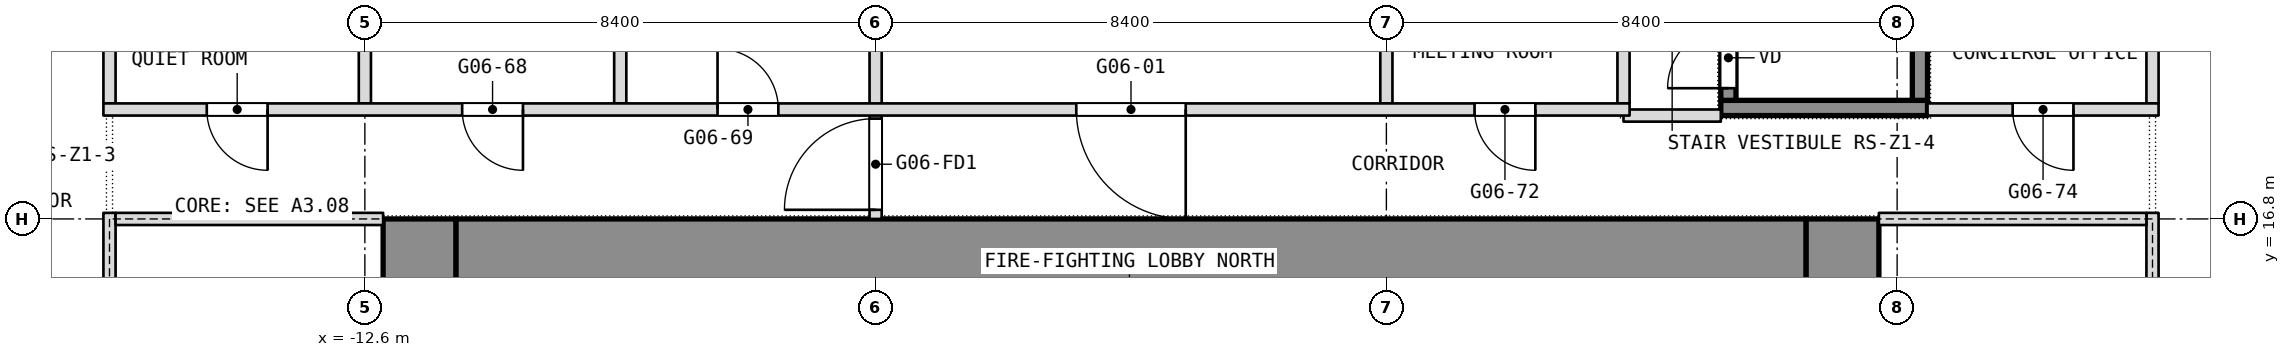
"""IFC4 building model, lengths in metres.
Left out: names, types, materials, properties, quantities, classifications, styles, units other than length and angle.
Written with IfcOpenShell. Run it as: python <this file> out.ifc"""

import sys

from ifc_helpers import new_model, si_unit, direction, frame, frame_2d, origin, place, context, subcontext, project, spatial, rectangle, extrude, element, fill, save


model = new_model("IFC4")
c1 = context("Model", 3, precision=1e-05, world=origin(), true_north=direction((0.0, 1.0)))
c2 = subcontext(c1, "Body", "Model", "MODEL_VIEW")
j1 = project(units=[si_unit("LENGTHUNIT", "METRE"), si_unit("PLANEANGLEUNIT", "RADIAN")], contexts=[c1])
p1 = place(None, origin())
s1 = spatial("IfcSite", under=j1, at=p1, CompositionType="ELEMENT")
p2 = place(p1, origin())
s2 = spatial("IfcBuilding", under=s1, at=p2, CompositionType="ELEMENT")
p3 = place(p2, frame((0.0, 0.0, 72.5)))
s3 = spatial("IfcBuildingStorey", under=s2, at=p3, CompositionType="ELEMENT", Elevation=72.5)
p4 = place(p3, frame((11.7, 0.0, 0.0), z_axis=(0.0, 0.0, 1.0), x_axis=(0.0, 1.0, 0.0)))
e1 = element("IfcWall", 1, at=p4, inside=s3, PredefinedType="SHEAR", context=c2, shape_type="SweptSolid", body=[
    extrude(rectangle(XDim=16.8, YDim=1.2, at=frame_2d((8.4, 0.0))), origin(), (0.0, 0.0, 1.0), 3.6),
])
p5 = place(p4, frame((1.688, 0.0, 0.0)))
e2 = element("IfcOpeningElement", 2, at=p5, cuts=e1, PredefinedType="OPENING", context=c2, shape_type="SweptSolid", body=[
    extrude(rectangle(XDim=0.9, YDim=2.1, at=frame_2d((0.45, 1.05))), frame((0.0, 0.6, 0.0), z_axis=(0.0, -1.0, 0.0), x_axis=(1.0, 0.0, 0.0)), (0.0, 0.0, 1.0), 1.2),
])
p6 = place(p4, frame((4.312, 0.0, 0.0)))
e3 = element("IfcOpeningElement", 3, at=p6, cuts=e1, PredefinedType="OPENING", context=c2, shape_type="SweptSolid", body=[
    extrude(rectangle(XDim=0.9, YDim=2.1, at=frame_2d((0.45, 1.05))), frame((0.0, 0.6, 0.0), z_axis=(0.0, -1.0, 0.0), x_axis=(1.0, 0.0, 0.0)), (0.0, 0.0, 1.0), 1.2),
])
p7 = place(p4, frame((6.825, 0.0, 0.0)))
e4 = element("IfcOpeningElement", 4, at=p7, cuts=e1, PredefinedType="OPENING", context=c2, shape_type="SweptSolid", body=[
    extrude(rectangle(XDim=1.2, YDim=2.1, at=frame_2d((0.6, 1.05))), frame((0.0, 0.6, 0.0), z_axis=(0.0, -1.0, 0.0), x_axis=(1.0, 0.0, 0.0)), (0.0, 0.0, 1.0), 1.2),
])
p8 = place(p4, frame((14.212, 0.0, 0.0)))
e5 = element("IfcOpeningElement", 5, at=p8, cuts=e1, PredefinedType="OPENING", context=c2, shape_type="SweptSolid", body=[
    extrude(rectangle(XDim=0.9, YDim=2.1, at=frame_2d((0.45, 1.05))), frame((0.0, 0.6, 0.0), z_axis=(0.0, -1.0, 0.0), x_axis=(1.0, 0.0, 0.0)), (0.0, 0.0, 1.0), 1.2),
])
p9 = place(p4, frame((11.587, 0.0, 0.0)))
e6 = element("IfcOpeningElement", 6, at=p9, cuts=e1, PredefinedType="OPENING", context=c2, shape_type="SweptSolid", body=[
    extrude(rectangle(XDim=0.9, YDim=2.1, at=frame_2d((0.45, 1.05))), frame((0.0, 0.6, 0.0), z_axis=(0.0, -1.0, 0.0), x_axis=(1.0, 0.0, 0.0)), (0.0, 0.0, 1.0), 1.2),
])
p10 = place(p4, frame((8.775, 0.0, 0.0)))
e7 = element("IfcOpeningElement", 7, at=p10, cuts=e1, PredefinedType="OPENING", context=c2, shape_type="SweptSolid", body=[
    extrude(rectangle(XDim=1.2, YDim=2.1, at=frame_2d((0.6, 1.05))), frame((0.0, 0.6, 0.0), z_axis=(0.0, -1.0, 0.0), x_axis=(1.0, 0.0, 0.0)), (0.0, 0.0, 1.0), 1.2),
])
p11 = place(p3, frame((-11.7, 0.0, 0.0), z_axis=(0.0, 0.0, 1.0), x_axis=(0.0, 1.0, 0.0)))
e8 = element("IfcWall", 8, at=p11, inside=s3, PredefinedType="SHEAR", context=c2, shape_type="SweptSolid", body=[
    extrude(rectangle(XDim=16.8, YDim=1.2, at=frame_2d((8.4, 0.0))), origin(), (0.0, 0.0, 1.0), 3.6),
])
p12 = place(p11, frame((2.3, 0.0, 0.0)))
e9 = element("IfcOpeningElement", 9, at=p12, cuts=e8, PredefinedType="OPENING", context=c2, shape_type="SweptSolid", body=[
    extrude(rectangle(XDim=1.1, YDim=2.1, at=frame_2d((0.55, 1.05))), frame((0.0, 0.6, 0.0), z_axis=(0.0, -1.0, 0.0), x_axis=(1.0, 0.0, 0.0)), (0.0, 0.0, 1.0), 1.2),
])
p13 = place(p11, frame((4.85, 0.0, 0.0)))
e10 = element("IfcOpeningElement", 10, at=p13, cuts=e8, PredefinedType="OPENING", context=c2, shape_type="SweptSolid", body=[
    extrude(rectangle(XDim=1.1, YDim=2.1, at=frame_2d((0.55, 1.05))), frame((0.0, 0.6, 0.0), z_axis=(0.0, -1.0, 0.0), x_axis=(1.0, 0.0, 0.0)), (0.0, 0.0, 1.0), 1.2),
])
p14 = place(p11, frame((6.825, 0.0, 0.0)))
e11 = element("IfcOpeningElement", 11, at=p14, cuts=e8, PredefinedType="OPENING", context=c2, shape_type="SweptSolid", body=[
    extrude(rectangle(XDim=1.2, YDim=2.1, at=frame_2d((0.6, 1.05))), frame((0.0, 0.6, 0.0), z_axis=(0.0, -1.0, 0.0), x_axis=(1.0, 0.0, 0.0)), (0.0, 0.0, 1.0), 1.2),
])
p15 = place(p11, frame((13.4, 0.0, 0.0)))
e12 = element("IfcOpeningElement", 12, at=p15, cuts=e8, PredefinedType="OPENING", context=c2, shape_type="SweptSolid", body=[
    extrude(rectangle(XDim=1.1, YDim=2.1, at=frame_2d((0.55, 1.05))), frame((0.0, 0.6, 0.0), z_axis=(0.0, -1.0, 0.0), x_axis=(1.0, 0.0, 0.0)), (0.0, 0.0, 1.0), 1.2),
])
p16 = place(p11, frame((10.85, 0.0, 0.0)))
e13 = element("IfcOpeningElement", 13, at=p16, cuts=e8, PredefinedType="OPENING", context=c2, shape_type="SweptSolid", body=[
    extrude(rectangle(XDim=1.1, YDim=2.1, at=frame_2d((0.55, 1.05))), frame((0.0, 0.6, 0.0), z_axis=(0.0, -1.0, 0.0), x_axis=(1.0, 0.0, 0.0)), (0.0, 0.0, 1.0), 1.2),
])
p17 = place(p11, frame((8.775, 0.0, 0.0)))
e14 = element("IfcOpeningElement", 14, at=p17, cuts=e8, PredefinedType="OPENING", context=c2, shape_type="SweptSolid", body=[
    extrude(rectangle(XDim=1.2, YDim=2.1, at=frame_2d((0.6, 1.05))), frame((0.0, 0.6, 0.0), z_axis=(0.0, -1.0, 0.0), x_axis=(1.0, 0.0, 0.0)), (0.0, 0.0, 1.0), 1.2),
])
p18 = place(p3, frame((-11.1, 16.2, 0.0), z_axis=(0.0, 0.0, 1.0), x_axis=(1.0, 0.0, 0.0)))
e15 = element("IfcWall", 15, at=p18, inside=s3, PredefinedType="SHEAR", context=c2, shape_type="SweptSolid", body=[
    extrude(rectangle(XDim=22.2, YDim=1.2, at=frame_2d((11.1, 0.0))), origin(), (0.0, 0.0, 1.0), 3.6),
])
p19 = place(p3, frame((16.8, 18.7, 0.0), z_axis=(0.0, 0.0, 1.0), x_axis=(0.0, 1.0, 0.0)))
e16 = element("IfcWall", 16, at=p19, inside=s3, PredefinedType="PARTITIONING", context=c2, shape_type="SweptSolid", body=[
    extrude(rectangle(XDim=3.0, YDim=0.2, at=frame_2d((1.5, 0.0))), origin(), (0.0, 0.0, 1.0), 3.34),
])
for number, where, z_axis, x_axis in (
    (17, (8.1, 18.7, 0.0), (0.0, 0.0, 1.0), (0.0, 1.0, 0.0)),
    (18, (4.2, 18.7, 0.0), (0.0, 0.0, 1.0), (0.0, 1.0, 0.0)),
):
    element("IfcWall", number, at=place(p3, frame(where, z_axis=z_axis, x_axis=x_axis)), inside=s3, PredefinedType="PARTITIONING", context=c2, shape_type="SweptSolid", body=[
        extrude(rectangle(XDim=2.8, YDim=0.2, at=frame_2d((1.4, 0.0))), origin(), (0.0, 0.0, 1.0), 3.34),
    ])
p20 = place(p3, frame((-4.2, 16.8, 0.0), z_axis=(0.0, 0.0, 1.0), x_axis=(0.0, 1.0, 0.0)))
e19 = element("IfcWall", 19, at=p20, inside=s3, PredefinedType="PARTITIONING", context=c2, shape_type="SweptSolid", body=[
    extrude(rectangle(XDim=6.7, YDim=0.2, at=frame_2d((3.35, 0.0))), origin(), (0.0, 0.0, 1.0), 3.34),
])
p21 = place(p20, frame((0.15, 0.0, 0.0)))
e20 = element("IfcOpeningElement", 20, at=p21, cuts=e19, PredefinedType="OPENING", context=c2, shape_type="SweptSolid", body=[
    extrude(rectangle(XDim=1.5, YDim=2.1, at=frame_2d((0.75, 1.05))), frame((0.0, 0.1, 0.0), z_axis=(0.0, -1.0, 0.0), x_axis=(1.0, 0.0, 0.0)), (0.0, 0.0, 1.0), 0.2),
])
p22 = place(p20, frame((4.95, 0.0, 0.0)))
e21 = element("IfcOpeningElement", 21, at=p22, cuts=e19, PredefinedType="OPENING", context=c2, shape_type="SweptSolid", body=[
    extrude(rectangle(XDim=1.5, YDim=2.1, at=frame_2d((0.75, 1.05))), frame((0.0, 0.1, 0.0), z_axis=(0.0, -1.0, 0.0), x_axis=(1.0, 0.0, 0.0)), (0.0, 0.0, 1.0), 0.2),
])
for number, where, z_axis, x_axis in (
    (22, (-8.4, 18.7, 0.0), (0.0, 0.0, 1.0), (0.0, 1.0, 0.0)),
    (23, (-12.6, 18.7, 0.0), (0.0, 0.0, 1.0), (0.0, 1.0, 0.0)),
):
    element("IfcWall", number, at=place(p3, frame(where, z_axis=z_axis, x_axis=x_axis)), inside=s3, PredefinedType="PARTITIONING", context=c2, shape_type="SweptSolid", body=[
        extrude(rectangle(XDim=2.8, YDim=0.2, at=frame_2d((1.4, 0.0))), origin(), (0.0, 0.0, 1.0), 3.34),
    ])
p23 = place(p3, frame((-16.8, 18.7, 0.0), z_axis=(0.0, 0.0, 1.0), x_axis=(0.0, 1.0, 0.0)))
e24 = element("IfcWall", 24, at=p23, inside=s3, PredefinedType="PARTITIONING", context=c2, shape_type="SweptSolid", body=[
    extrude(rectangle(XDim=3.0, YDim=0.2, at=frame_2d((1.5, 0.0))), origin(), (0.0, 0.0, 1.0), 3.34),
])
p24 = place(p3, frame((8.1, 18.5, 0.0), z_axis=(0.0, 0.0, 1.0), x_axis=(1.0, 0.0, 0.0)))
e25 = element("IfcWall", 25, at=p24, inside=s3, PredefinedType="PARTITIONING", context=c2, shape_type="SweptSolid", body=[
    extrude(rectangle(XDim=1.6, YDim=0.2, at=frame_2d((0.8, 0.0))), origin(), (0.0, 0.0, 1.0), 3.34),
])
p25 = place(p3, frame((-16.9, 18.6, 0.0), z_axis=(0.0, 0.0, 1.0), x_axis=(1.0, 0.0, 0.0)))
e26 = element("IfcWall", 26, at=p25, inside=s3, PredefinedType="PARTITIONING", context=c2, shape_type="SweptSolid", body=[
    extrude(rectangle(XDim=25.1, YDim=0.2, at=frame_2d((12.55, 0.0))), origin(), (0.0, 0.0, 1.0), 3.34),
])
p26 = place(p25, frame((16.0, 0.0, 0.0)))
e27 = element("IfcOpeningElement", 27, at=p26, cuts=e26, PredefinedType="OPENING", context=c2, shape_type="SweptSolid", body=[
    extrude(rectangle(XDim=1.8, YDim=2.1, at=frame_2d((0.9, 1.05))), frame((0.0, 0.1, 0.0), z_axis=(0.0, -1.0, 0.0), x_axis=(1.0, 0.0, 0.0)), (0.0, 0.0, 1.0), 0.2),
])
p27 = place(p25, frame((5.9, 0.0, 0.0)))
e28 = element("IfcOpeningElement", 28, at=p27, cuts=e26, PredefinedType="OPENING", context=c2, shape_type="SweptSolid", body=[
    extrude(rectangle(XDim=1.0, YDim=2.1, at=frame_2d((0.5, 1.05))), frame((0.0, 0.1, 0.0), z_axis=(0.0, -1.0, 0.0), x_axis=(1.0, 0.0, 0.0)), (0.0, 0.0, 1.0), 0.2),
])
p28 = place(p25, frame((10.1, 0.0, 0.0)))
e29 = element("IfcOpeningElement", 29, at=p28, cuts=e26, PredefinedType="OPENING", context=c2, shape_type="SweptSolid", body=[
    extrude(rectangle(XDim=1.0, YDim=2.1, at=frame_2d((0.5, 1.05))), frame((0.0, 0.1, 0.0), z_axis=(0.0, -1.0, 0.0), x_axis=(1.0, 0.0, 0.0)), (0.0, 0.0, 1.0), 0.2),
])
p29 = place(p25, frame((1.7, 0.0, 0.0)))
e30 = element("IfcOpeningElement", 30, at=p29, cuts=e26, PredefinedType="OPENING", context=c2, shape_type="SweptSolid", body=[
    extrude(rectangle(XDim=1.0, YDim=2.1, at=frame_2d((0.5, 1.05))), frame((0.0, 0.1, 0.0), z_axis=(0.0, -1.0, 0.0), x_axis=(1.0, 0.0, 0.0)), (0.0, 0.0, 1.0), 0.2),
])
p30 = place(p25, frame((22.55, 0.0, 0.0)))
e31 = element("IfcOpeningElement", 31, at=p30, cuts=e26, PredefinedType="OPENING", context=c2, shape_type="SweptSolid", body=[
    extrude(rectangle(XDim=1.0, YDim=2.1, at=frame_2d((0.5, 1.05))), frame((0.0, 0.1, 0.0), z_axis=(0.0, -1.0, 0.0), x_axis=(1.0, 0.0, 0.0)), (0.0, 0.0, 1.0), 0.2),
])
p31 = place(p3, frame((13.1, 18.6, 0.0), z_axis=(0.0, 0.0, 1.0), x_axis=(1.0, 0.0, 0.0)))
e32 = element("IfcWall", 32, at=p31, inside=s3, PredefinedType="PARTITIONING", context=c2, shape_type="SweptSolid", body=[
    extrude(rectangle(XDim=3.8, YDim=0.2, at=frame_2d((1.9, 0.0))), origin(), (0.0, 0.0, 1.0), 3.34),
])
p32 = place(p31, frame((1.4, 0.0, 0.0)))
e33 = element("IfcOpeningElement", 33, at=p32, cuts=e32, PredefinedType="OPENING", context=c2, shape_type="SweptSolid", body=[
    extrude(rectangle(XDim=1.0, YDim=2.1, at=frame_2d((0.5, 1.05))), frame((0.0, 0.1, 0.0), z_axis=(0.0, -1.0, 0.0), x_axis=(1.0, 0.0, 0.0)), (0.0, 0.0, 1.0), 0.2),
])
p33 = place(p3, frame((-16.8, -0.1, 0.0), z_axis=(0.0, 0.0, 1.0), x_axis=(0.0, 1.0, 0.0)))
e34 = element("IfcWall", 34, at=p33, inside=s3, PredefinedType="PARTITIONING", context=c2, shape_type="SweptSolid", body=[
    extrude(rectangle(XDim=17.0, YDim=0.2, at=frame_2d((8.5, 0.0))), origin(), (0.0, 0.0, 1.0), 3.34),
])
p34 = place(p33, frame((2.2, 0.0, 0.0)))
e35 = element("IfcOpeningElement", 35, at=p34, cuts=e34, PredefinedType="OPENING", context=c2, shape_type="SweptSolid", body=[
    extrude(rectangle(XDim=1.8, YDim=2.1, at=frame_2d((0.9, 1.05))), frame((0.0, 0.1, 0.0), z_axis=(0.0, -1.0, 0.0), x_axis=(1.0, 0.0, 0.0)), (0.0, 0.0, 1.0), 0.2),
])
p35 = place(p33, frame((7.2, 0.0, 0.0)))
e36 = element("IfcOpeningElement", 36, at=p35, cuts=e34, PredefinedType="OPENING", context=c2, shape_type="SweptSolid", body=[
    extrude(rectangle(XDim=1.8, YDim=2.1, at=frame_2d((0.9, 1.05))), frame((0.0, 0.1, 0.0), z_axis=(0.0, -1.0, 0.0), x_axis=(1.0, 0.0, 0.0)), (0.0, 0.0, 1.0), 0.2),
])
p36 = place(p3, frame((-16.7, 16.8, 0.0), z_axis=(0.0, 0.0, 1.0), x_axis=(1.0, 0.0, 0.0)))
e37 = element("IfcWall", 37, at=p36, inside=s3, PredefinedType="PARTITIONING", context=c2, shape_type="SweptSolid", body=[
    extrude(rectangle(XDim=4.4, YDim=0.2, at=frame_2d((2.2, 0.0))), origin(), (0.0, 0.0, 1.0), 2.84),
])
p37 = place(p3, frame((16.8, -0.1, 0.0), z_axis=(0.0, 0.0, 1.0), x_axis=(0.0, 1.0, 0.0)))
e38 = element("IfcWall", 38, at=p37, inside=s3, PredefinedType="PARTITIONING", context=c2, shape_type="SweptSolid", body=[
    extrude(rectangle(XDim=17.0, YDim=0.2, at=frame_2d((8.5, 0.0))), origin(), (0.0, 0.0, 1.0), 3.34),
])
p38 = place(p37, frame((2.2, 0.0, 0.0)))
e39 = element("IfcOpeningElement", 39, at=p38, cuts=e38, PredefinedType="OPENING", context=c2, shape_type="SweptSolid", body=[
    extrude(rectangle(XDim=1.8, YDim=2.1, at=frame_2d((0.9, 1.05))), frame((0.0, 0.1, 0.0), z_axis=(0.0, -1.0, 0.0), x_axis=(1.0, 0.0, 0.0)), (0.0, 0.0, 1.0), 0.2),
])
p39 = place(p37, frame((13.0, 0.0, 0.0)))
e40 = element("IfcOpeningElement", 40, at=p39, cuts=e38, PredefinedType="OPENING", context=c2, shape_type="SweptSolid", body=[
    extrude(rectangle(XDim=1.8, YDim=2.1, at=frame_2d((0.9, 1.05))), frame((0.0, 0.1, 0.0), z_axis=(0.0, -1.0, 0.0), x_axis=(1.0, 0.0, 0.0)), (0.0, 0.0, 1.0), 0.2),
])
p40 = place(p3, frame((12.3, 16.8, 0.0), z_axis=(0.0, 0.0, 1.0), x_axis=(1.0, 0.0, 0.0)))
e41 = element("IfcWall", 41, at=p40, inside=s3, PredefinedType="PARTITIONING", context=c2, shape_type="SweptSolid", body=[
    extrude(rectangle(XDim=4.4, YDim=0.2, at=frame_2d((2.2, 0.0))), origin(), (0.0, 0.0, 1.0), 2.84),
])
p41 = place(p3, frame((9.7, 18.625, 0.1), z_axis=(0.0, 0.0, 1.0), x_axis=(1.0, 0.0, 0.0)))
e42 = element("IfcWall", 42, at=p41, inside=s3, PredefinedType="SHEAR", context=c2, shape_type="SweptSolid", body=[
    extrude(rectangle(XDim=3.4, YDim=0.25, at=frame_2d((1.7, 0.0))), origin(), (0.0, 0.0, 1.0), 3.6),
])
p42 = place(p3, frame((9.825, 18.75, 0.1), z_axis=(0.0, 0.0, 1.0), x_axis=(0.0, 1.0, 0.0)))
e43 = element("IfcWall", 43, at=p42, inside=s3, PredefinedType="SHEAR", context=c2, shape_type="SweptSolid", body=[
    extrude(rectangle(XDim=5.7, YDim=0.25, at=frame_2d((2.85, 0.0))), origin(), (0.0, 0.0, 1.0), 3.6),
])
p43 = place(p42, frame((0.2, 0.0, 0.0)))
e44 = element("IfcOpeningElement", 44, at=p43, cuts=e43, PredefinedType="OPENING", context=c2, shape_type="SweptSolid", body=[
    extrude(rectangle(XDim=1.0, YDim=2.1, at=frame_2d((0.5, 1.05))), frame((0.0, 0.125, 0.0), z_axis=(0.0, -1.0, 0.0), x_axis=(1.0, 0.0, 0.0)), (0.0, 0.0, 1.0), 0.25),
])
p44 = place(p3, frame((12.975, 18.75, 0.1), z_axis=(0.0, 0.0, 1.0), x_axis=(0.0, 1.0, 0.0)))
e45 = element("IfcWall", 45, at=p44, inside=s3, PredefinedType="SHEAR", context=c2, shape_type="SweptSolid", body=[
    extrude(rectangle(XDim=5.7, YDim=0.25, at=frame_2d((2.85, 0.0))), origin(), (0.0, 0.0, 1.0), 3.6),
])
p45 = place(p26, origin())
e46 = element("IfcDoor", 46, at=p45, inside=s3, OperationType="DOUBLE_DOOR_SINGLE_SWING", PredefinedType="DOOR", context=c2, shape_type="SweptSolid", body=[
    extrude(rectangle(XDim=1.8, YDim=2.1, at=frame_2d((0.9, 1.05))), frame((0.0, 0.025, 0.0), z_axis=(0.0, -1.0, 0.0), x_axis=(1.0, 0.0, 0.0)), (0.0, 0.0, 1.0), 0.05),
])
fill(e27, e46)
p46 = place(p27, origin())
e47 = element("IfcDoor", 47, at=p46, inside=s3, OperationType="SINGLE_SWING_RIGHT", PredefinedType="DOOR", context=c2, shape_type="SweptSolid", body=[
    extrude(rectangle(XDim=1.0, YDim=2.1, at=frame_2d((0.5, 1.05))), frame((0.0, 0.025, 0.0), z_axis=(0.0, -1.0, 0.0), x_axis=(1.0, 0.0, 0.0)), (0.0, 0.0, 1.0), 0.05),
])
fill(e28, e47)
p47 = place(p28, origin())
e48 = element("IfcDoor", 48, at=p47, inside=s3, OperationType="SINGLE_SWING_LEFT", PredefinedType="DOOR", context=c2, shape_type="SweptSolid", body=[
    extrude(rectangle(XDim=1.0, YDim=2.1, at=frame_2d((0.5, 1.05))), frame((0.0, 0.025, 0.0), z_axis=(0.0, -1.0, 0.0), x_axis=(1.0, 0.0, 0.0)), (0.0, 0.0, 1.0), 0.05),
])
fill(e29, e48)
p48 = place(p29, origin())
e49 = element("IfcDoor", 49, at=p48, inside=s3, OperationType="SINGLE_SWING_RIGHT", PredefinedType="DOOR", context=c2, shape_type="SweptSolid", body=[
    extrude(rectangle(XDim=1.0, YDim=2.1, at=frame_2d((0.5, 1.05))), frame((0.0, 0.025, 0.0), z_axis=(0.0, -1.0, 0.0), x_axis=(1.0, 0.0, 0.0)), (0.0, 0.0, 1.0), 0.05),
])
fill(e30, e49)
p49 = place(p30, origin())
e50 = element("IfcDoor", 50, at=p49, inside=s3, OperationType="SINGLE_SWING_RIGHT", PredefinedType="DOOR", context=c2, shape_type="SweptSolid", body=[
    extrude(rectangle(XDim=1.0, YDim=2.1, at=frame_2d((0.5, 1.05))), frame((0.0, 0.025, 0.0), z_axis=(0.0, -1.0, 0.0), x_axis=(1.0, 0.0, 0.0)), (0.0, 0.0, 1.0), 0.05),
])
fill(e31, e50)
p50 = place(p32, origin())
e51 = element("IfcDoor", 51, at=p50, inside=s3, OperationType="SINGLE_SWING_LEFT", PredefinedType="DOOR", context=c2, shape_type="SweptSolid", body=[
    extrude(rectangle(XDim=1.0, YDim=2.1, at=frame_2d((0.5, 1.05))), frame((0.0, 0.025, 0.0), z_axis=(0.0, -1.0, 0.0), x_axis=(1.0, 0.0, 0.0)), (0.0, 0.0, 1.0), 0.05),
])
fill(e33, e51)
p51 = place(p43, origin())
e52 = element("IfcDoor", 52, at=p51, inside=s3, OperationType="SINGLE_SWING_LEFT", PredefinedType="DOOR", context=c2, shape_type="SweptSolid", body=[
    extrude(rectangle(XDim=1.0, YDim=2.1, at=frame_2d((0.5, 1.05))), frame((0.0, 0.025, 0.0), z_axis=(0.0, -1.0, 0.0), x_axis=(1.0, 0.0, 0.0)), (0.0, 0.0, 1.0), 0.05),
])
fill(e44, e52)
p52 = place(p21, origin())
e53 = element("IfcDoor", 53, at=p52, inside=s3, OperationType="DOUBLE_DOOR_DOUBLE_SWING", PredefinedType="DOOR", context=c2, shape_type="SweptSolid", body=[
    extrude(rectangle(XDim=1.5, YDim=2.1, at=frame_2d((0.75, 1.05))), frame((0.0, 0.025, 0.0), z_axis=(0.0, -1.0, 0.0), x_axis=(1.0, 0.0, 0.0)), (0.0, 0.0, 1.0), 0.05),
])
fill(e20, e53)
save(model, sys.argv[1])
